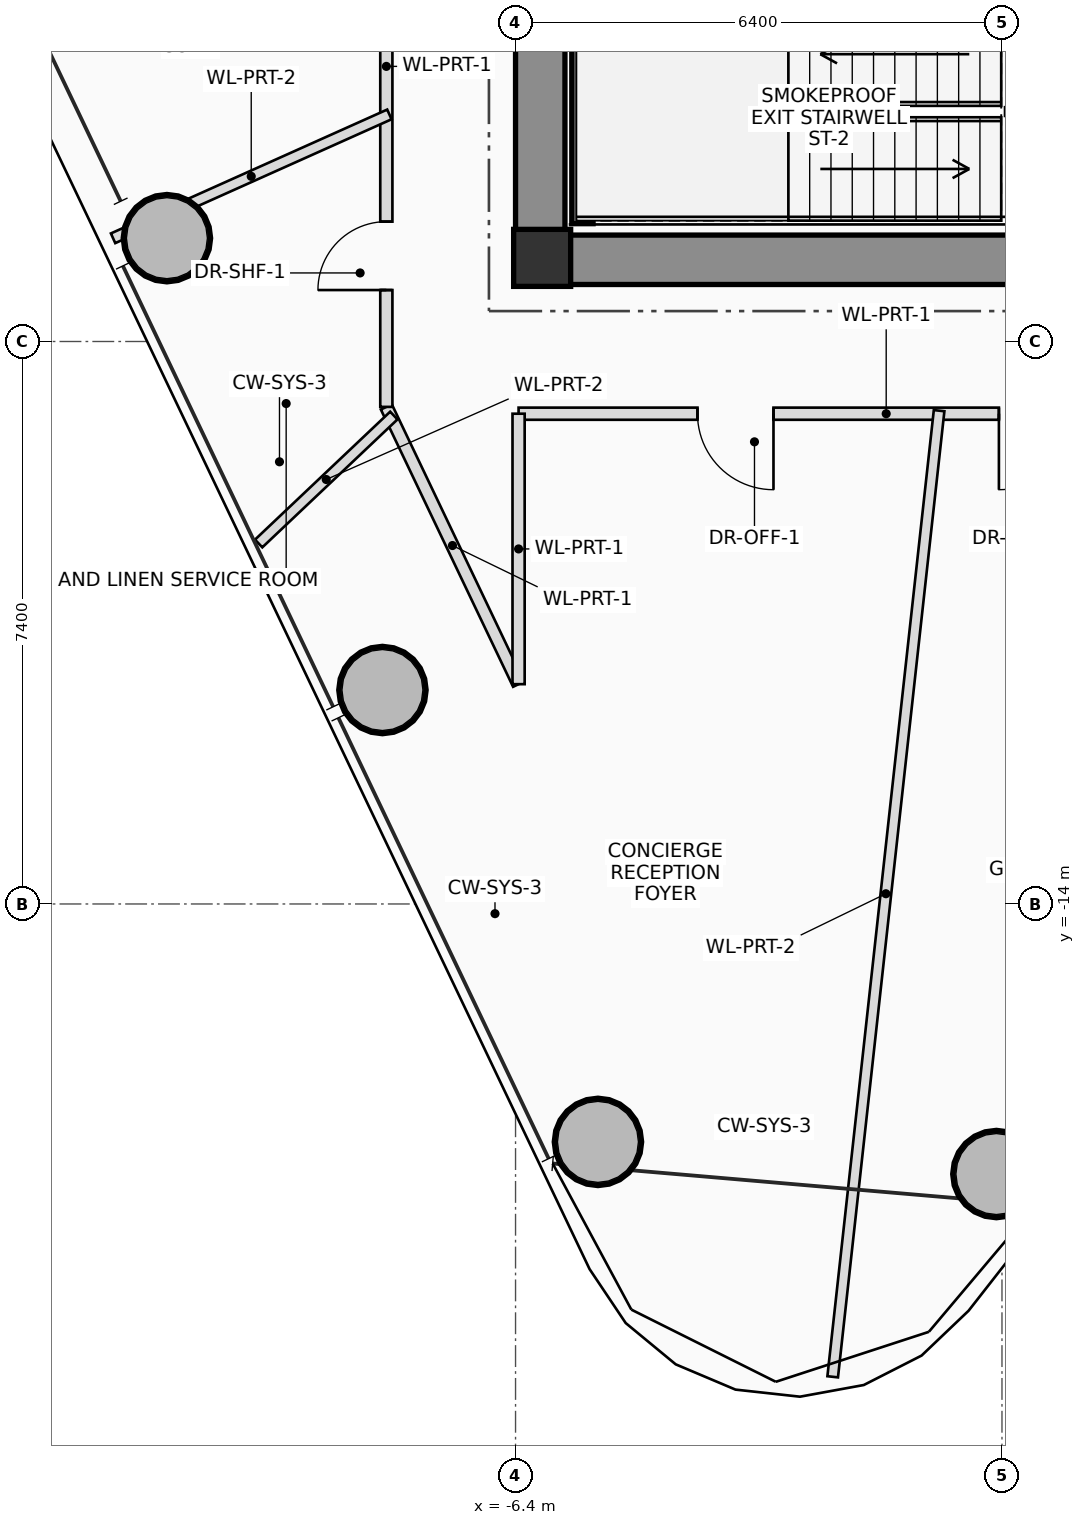
"""IFC4 building model, lengths in metres.
Left out: names, types, materials, properties, quantities, classifications, styles, units other than length and angle.
Written with IfcOpenShell. Run it as: python <this file> out.ifc"""

import sys

from ifc_helpers import new_model, si_unit, direction, frame, frame_2d, origin, origin_2d, place, context, subcontext, project, spatial, rectangle, hollow_circle, extrude, source, transform, mapped, element, fill, save


model = new_model("IFC4")
c1 = context("Model", 3, precision=1e-05, world=origin(), true_north=direction((0.0, 1.0)))
c2 = subcontext(c1, "Body", "Model", "MODEL_VIEW")
j1 = project(units=[si_unit("LENGTHUNIT", "METRE"), si_unit("PLANEANGLEUNIT", "RADIAN")], contexts=[c1])
p1 = place(None, origin())
s1 = spatial("IfcSite", under=j1, at=p1, CompositionType="ELEMENT")
p2 = place(p1, origin())
s2 = spatial("IfcBuilding", under=s1, at=p2, CompositionType="ELEMENT")
p3 = place(p2, frame((0.0, 0.0, 208.7)))
s3 = spatial("IfcBuildingStorey", under=s2, at=p3, CompositionType="ELEMENT", Elevation=208.7)
m1 = source(origin(), c2, "Body", "SweptSolid", [
    extrude(rectangle(XDim=0.75, YDim=0.75, at=origin_2d()), origin(), (0.0, 0.0, 1.0), 3.45),
])
p4 = place(p3, frame((-6.05, -5.5, 0.0), z_axis=(0.0, 0.0, 1.0), x_axis=(1.0, 0.0, 0.0)))
e1 = element("IfcColumn", 1, at=p4, inside=s3, PredefinedType="COLUMN", context=c2, shape_type="MappedRepresentation", body=[
    mapped(m1, transform((0.0, 0.0, 0.0), scale=1.0)),
])
p5 = place(p3, frame((-6.4, -5.525, 0.0), z_axis=(0.0, 0.0, 1.0), x_axis=(1.0, 0.0, 0.0)))
e2 = element("IfcWall", 2, at=p5, inside=s3, PredefinedType="SHEAR", context=c2, shape_type="SweptSolid", body=[
    extrude(rectangle(XDim=12.8, YDim=0.65, at=frame_2d((6.4, 0.0))), origin(), (0.0, 0.0, 1.0), 3.45),
])
p6 = place(p5, frame((8.6, 0.0, 0.0)))
e3 = element("IfcOpeningElement", 3, at=p6, cuts=e2, PredefinedType="OPENING", context=c2, shape_type="SweptSolid", body=[
    extrude(rectangle(XDim=1.2, YDim=2.2, at=frame_2d((0.6, 1.1))), frame((0.0, 0.335, 0.0), z_axis=(0.0, -1.0, 0.0), x_axis=(1.0, 0.0, 0.0)), (0.0, 0.0, 1.0), 0.67),
])
p7 = place(p3, frame((-6.075, -5.2, 0.0), z_axis=(0.0, 0.0, 1.0), x_axis=(0.0, 1.0, 0.0)))
e4 = element("IfcWall", 4, at=p7, inside=s3, PredefinedType="SHEAR", context=c2, shape_type="SweptSolid", body=[
    extrude(rectangle(XDim=3.45, YDim=0.65, at=frame_2d((1.725, 0.0))), origin(), (0.0, 0.0, 1.0), 3.45),
])
p8 = place(p3, frame((-5.52, -5.05, 0.0), z_axis=(0.0, 0.0, 1.0), x_axis=(0.0, 1.0, 0.0)))
e5 = element("IfcWall", 5, at=p8, inside=s3, PredefinedType="SHEAR", context=c2, shape_type="SweptSolid", body=[
    extrude(rectangle(XDim=2.75, YDim=0.28, at=frame_2d((1.375, 0.0))), origin(), (0.0, 0.0, 1.0), 3.45),
])
m2 = source(origin(), c2, "Body", "SweptSolid", [
    extrude(hollow_circle(Radius=0.575, WallThickness=0.042, at=origin_2d()), origin(), (0.0, 0.0, 1.0), 3.45),
])
for number, where, z_axis, x_axis in (
    (6, (-0.073, -17.553, 0.0), (0.0, 0.0, 1.0), (1.0, 0.0, 0.0)),
    (7, (-10.987, -5.24, 0.0), (0.0, 0.0, 1.0), (1.0, 0.0, 0.0)),
    (8, (-8.151, -11.185, 0.0), (0.0, 0.0, 1.0), (1.0, 0.0, 0.0)),
    (9, (-5.316, -17.13, 0.0), (0.0, 0.0, 1.0), (1.0, 0.0, 0.0)),
):
    element("IfcColumn", number, at=place(p3, frame(where, z_axis=z_axis, x_axis=x_axis)), inside=s3, PredefinedType="COLUMN", context=c2, shape_type="MappedRepresentation", body=[
        mapped(m2, transform((0.0, 0.0, 0.0), scale=1.0)),
    ])
p9 = place(p3, frame((-6.36, -11.108, 0.0), z_axis=(0.0, 0.0, 1.0), x_axis=(-0.430489180359, 0.902595737633, 0.0)))
e10 = element("IfcWall", 10, at=p9, inside=s3, PredefinedType="PARTITIONING", context=c2, shape_type="SweptSolid", body=[
    extrude(rectangle(XDim=4.042, YDim=0.16, at=frame_2d((2.021, 0.0))), origin(), (0.0, 0.0, 1.0), 2.605),
])
p10 = place(p3, frame((-8.1, -7.46, 0.0), z_axis=(0.0, 0.0, 1.0), x_axis=(0.0, 1.0, 0.0)))
e11 = element("IfcWall", 11, at=p10, inside=s3, PredefinedType="PARTITIONING", context=c2, shape_type="SweptSolid", body=[
    extrude(rectangle(XDim=15.01, YDim=0.16, at=frame_2d((7.505, 0.0))), origin(), (0.0, 0.0, 1.0), 2.605),
])
p11 = place(p10, frame((1.537, 0.0, 0.0)))
e12 = element("IfcOpeningElement", 12, at=p11, cuts=e11, PredefinedType="OPENING", context=c2, shape_type="SweptSolid", body=[
    extrude(rectangle(XDim=0.9, YDim=2.05, at=frame_2d((0.45, 1.025))), frame((0.0, 0.09, 0.0), z_axis=(0.0, -1.0, 0.0), x_axis=(1.0, 0.0, 0.0)), (0.0, 0.0, 1.0), 0.18),
])
p12 = place(p10, frame((6.522, 0.0, 0.0)))
e13 = element("IfcOpeningElement", 13, at=p12, cuts=e11, PredefinedType="OPENING", context=c2, shape_type="SweptSolid", body=[
    extrude(rectangle(XDim=1.05, YDim=2.2, at=frame_2d((0.525, 1.1))), frame((0.0, 0.09, 0.0), z_axis=(0.0, -1.0, 0.0), x_axis=(1.0, 0.0, 0.0)), (0.0, 0.0, 1.0), 0.18),
])
p13 = place(p10, frame((11.604, 0.0, 0.0)))
e14 = element("IfcOpeningElement", 14, at=p13, cuts=e11, PredefinedType="OPENING", context=c2, shape_type="SweptSolid", body=[
    extrude(rectangle(XDim=1.05, YDim=2.2, at=frame_2d((0.525, 1.1))), frame((0.0, 0.09, 0.0), z_axis=(0.0, -1.0, 0.0), x_axis=(1.0, 0.0, 0.0)), (0.0, 0.0, 1.0), 0.18),
])
p14 = place(p3, frame((5.25, -7.55, 0.0), z_axis=(0.0, 0.0, 1.0), x_axis=(-1.0, 0.0, 0.0)))
e15 = element("IfcWall", 15, at=p14, inside=s3, PredefinedType="PARTITIONING", context=c2, shape_type="SweptSolid", body=[
    extrude(rectangle(XDim=11.61, YDim=0.16, at=frame_2d((5.805, 0.0))), origin(), (0.0, 0.0, 1.0), 2.605),
])
p15 = place(p14, frame((1.337, 0.0, 0.0)))
e16 = element("IfcOpeningElement", 16, at=p15, cuts=e15, PredefinedType="OPENING", context=c2, shape_type="SweptSolid", body=[
    extrude(rectangle(XDim=1.0, YDim=2.25, at=frame_2d((0.5, 1.125))), frame((0.0, 0.09, 0.0), z_axis=(0.0, -1.0, 0.0), x_axis=(1.0, 0.0, 0.0)), (0.0, 0.0, 1.0), 0.18),
])
p16 = place(p14, frame((4.29, 0.0, 0.0)))
e17 = element("IfcOpeningElement", 17, at=p16, cuts=e15, PredefinedType="OPENING", context=c2, shape_type="SweptSolid", body=[
    extrude(rectangle(XDim=1.0, YDim=2.25, at=frame_2d((0.5, 1.125))), frame((0.0, 0.09, 0.0), z_axis=(0.0, -1.0, 0.0), x_axis=(1.0, 0.0, 0.0)), (0.0, 0.0, 1.0), 0.18),
])
p17 = place(p14, frame((8.256, 0.0, 0.0)))
e18 = element("IfcOpeningElement", 18, at=p17, cuts=e15, PredefinedType="OPENING", context=c2, shape_type="SweptSolid", body=[
    extrude(rectangle(XDim=1.0, YDim=2.25, at=frame_2d((0.5, 1.125))), frame((0.0, 0.09, 0.0), z_axis=(0.0, -1.0, 0.0), x_axis=(1.0, 0.0, 0.0)), (0.0, 0.0, 1.0), 0.18),
])
p18 = place(p3, frame((-6.36, -7.55, 0.0), z_axis=(0.0, 0.0, 1.0), x_axis=(0.0, -1.0, 0.0)))
e19 = element("IfcWall", 19, at=p18, inside=s3, PredefinedType="PARTITIONING", context=c2, shape_type="SweptSolid", body=[
    extrude(rectangle(XDim=3.558, YDim=0.16, at=frame_2d((1.779, 0.0))), origin(), (0.0, 0.0, 1.0), 3.25),
])
p19 = place(p3, frame((-8.06, -3.613, 0.0), z_axis=(0.0, 0.0, 1.0), x_axis=(-0.91252825503, -0.409013671865, 0.0)))
e20 = element("IfcWall", 20, at=p19, inside=s3, PredefinedType="PARTITIONING", context=c2, shape_type="SweptSolid", body=[
    extrude(rectangle(XDim=3.984, YDim=0.14, at=frame_2d((1.992, 0.0))), origin(), (0.0, 0.0, 1.0), 2.805),
])
p20 = place(p3, frame((-8.001, -7.574, 0.0), z_axis=(0.0, 0.0, 1.0), x_axis=(-0.726232954986, -0.687448685424, 0.0)))
e21 = element("IfcWall", 21, at=p20, inside=s3, PredefinedType="PARTITIONING", context=c2, shape_type="SweptSolid", body=[
    extrude(rectangle(XDim=2.449, YDim=0.14, at=frame_2d((1.224, 0.0))), origin(), (0.0, 0.0, 1.0), 2.765),
])
p21 = place(p3, frame((-0.827, -7.51, 0.0), z_axis=(0.0, 0.0, 1.0), x_axis=(-0.109492708445, -0.993987598915, 0.0)))
e22 = element("IfcWall", 22, at=p21, inside=s3, PredefinedType="PARTITIONING", context=c2, shape_type="SweptSolid", body=[
    extrude(rectangle(XDim=12.788, YDim=0.14, at=frame_2d((6.394, 0.0))), origin(), (0.0, 0.0, 1.0), 2.605),
])
p22 = place(p11, origin())
e23 = element("IfcDoor", 23, at=p22, inside=s3, OperationType="SINGLE_SWING_LEFT", PredefinedType="DOOR", context=c2, shape_type="SweptSolid", body=[
    extrude(rectangle(XDim=0.9, YDim=2.05, at=frame_2d((0.45, 1.025))), frame((0.0, 0.025, 0.0), z_axis=(0.0, -1.0, 0.0), x_axis=(1.0, 0.0, 0.0)), (0.0, 0.0, 1.0), 0.05),
])
fill(e12, e23)
p23 = place(p16, origin())
e24 = element("IfcDoor", 24, at=p23, inside=s3, OperationType="SINGLE_SWING_RIGHT", PredefinedType="DOOR", context=c2, shape_type="SweptSolid", body=[
    extrude(rectangle(XDim=1.0, YDim=2.25, at=frame_2d((0.5, 1.125))), frame((0.0, 0.025, 0.0), z_axis=(0.0, -1.0, 0.0), x_axis=(1.0, 0.0, 0.0)), (0.0, 0.0, 1.0), 0.05),
])
fill(e17, e24)
p24 = place(p17, origin())
e25 = element("IfcDoor", 25, at=p24, inside=s3, OperationType="SINGLE_SWING_LEFT", PredefinedType="DOOR", context=c2, shape_type="SweptSolid", body=[
    extrude(rectangle(XDim=1.0, YDim=2.25, at=frame_2d((0.5, 1.125))), frame((0.0, 0.025, 0.0), z_axis=(0.0, -1.0, 0.0), x_axis=(1.0, 0.0, 0.0)), (0.0, 0.0, 1.0), 0.05),
])
fill(e18, e25)
save(model, sys.argv[1])
